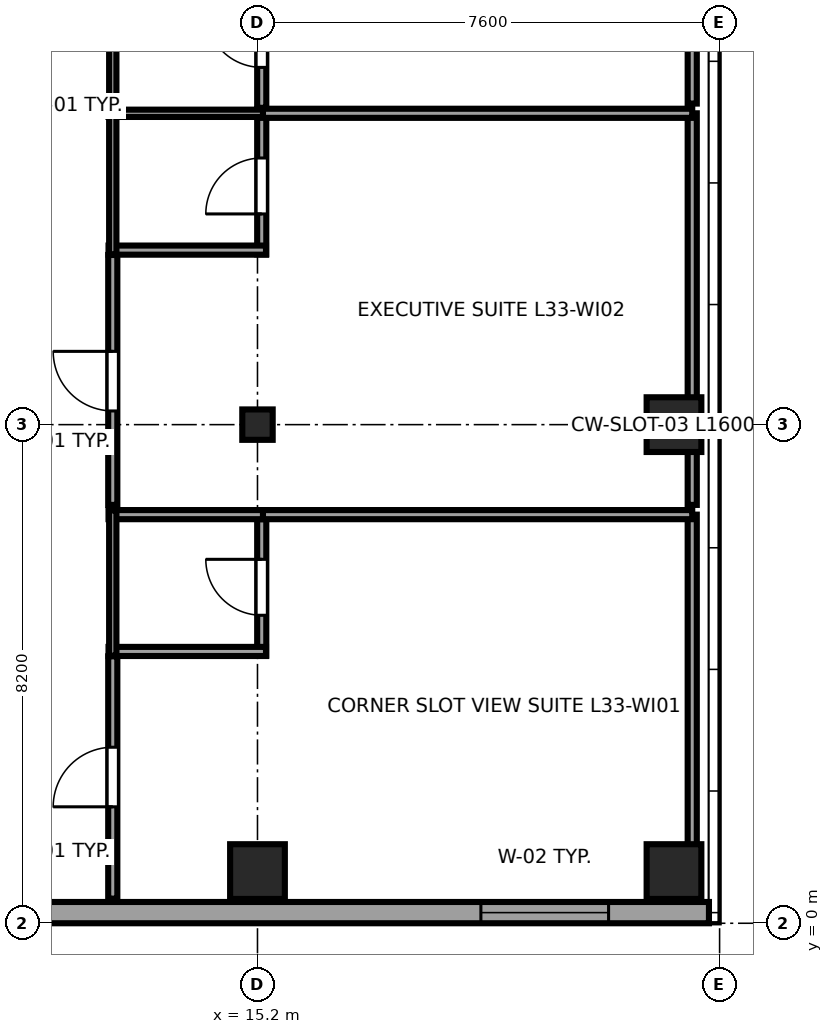
"""IFC4 building model, lengths in metres.
Left out: names, types, materials, properties, quantities, classifications, styles, units other than length and angle.
Written with IfcOpenShell. Run it as: python <this file> out.ifc"""

import sys

from ifc_helpers import new_model, si_unit, direction, frame, frame_2d, origin, origin_2d, place, context, subcontext, project, spatial, rectangle, i_section, extrude, source, transform, mapped, element, fill, save


model = new_model("IFC4")
c1 = context("Model", 3, precision=1e-05, world=origin(), true_north=direction((0.0, 1.0)))
c2 = subcontext(c1, "Body", "Model", "MODEL_VIEW")
j1 = project(units=[si_unit("LENGTHUNIT", "METRE"), si_unit("PLANEANGLEUNIT", "RADIAN")], contexts=[c1])
p1 = place(None, origin())
s1 = spatial("IfcSite", under=j1, at=p1, CompositionType="ELEMENT")
p2 = place(p1, origin())
s2 = spatial("IfcBuilding", under=s1, at=p2, CompositionType="ELEMENT")
p3 = place(p2, frame((0.0, 0.0, 129.3)))
s3 = spatial("IfcBuildingStorey", under=s2, at=p3, CompositionType="ELEMENT", Elevation=129.3)
m1 = source(origin(), c2, "Body", "SweptSolid", [
    extrude(rectangle(XDim=0.9, YDim=0.9, at=origin_2d()), origin(), (0.0, 0.0, 1.0), 3.55),
])
p4 = place(p3, frame((15.2, 0.85, 0.0), z_axis=(0.0, 0.0, 1.0), x_axis=(1.0, 0.0, 0.0)))
e1 = element("IfcColumn", 1, at=p4, inside=s3, PredefinedType="COLUMN", context=c2, shape_type="MappedRepresentation", body=[
    mapped(m1, transform((0.0, 0.0, 0.0), x_axis=(1.0, 0.0, 0.0), y_axis=(0.0, 1.0, 0.0), z_axis=(0.0, 0.0, 1.0), scale=1.0)),
])
m2 = source(origin(), c2, "Body", "SweptSolid", [
    extrude(i_section(OverallWidth=0.5, OverallDepth=0.5, WebThickness=0.022, FlangeThickness=0.034, at=origin_2d()), origin(), (0.0, 0.0, 1.0), 3.55),
])
p5 = place(p3, frame((15.2, 8.2, 0.0), z_axis=(0.0, 0.0, 1.0), x_axis=(1.0, 0.0, 0.0)))
e2 = element("IfcColumn", 2, at=p5, inside=s3, PredefinedType="COLUMN", context=c2, shape_type="MappedRepresentation", body=[
    mapped(m2, transform((0.0, 0.0, 0.0), x_axis=(1.0, 0.0, 0.0), y_axis=(0.0, 1.0, 0.0), z_axis=(0.0, 0.0, 1.0), scale=1.0)),
])
for number, where, z_axis, x_axis in (
    (3, (22.05, 0.85, 0.0), (0.0, 0.0, 1.0), (1.0, 0.0, 0.0)),
    (4, (22.05, 8.2, 0.0), (0.0, 0.0, 1.0), (1.0, 0.0, 0.0)),
):
    element("IfcColumn", number, at=place(p3, frame(where, z_axis=z_axis, x_axis=x_axis)), inside=s3, PredefinedType="COLUMN", context=c2, shape_type="MappedRepresentation", body=[
        mapped(m1, transform((0.0, 0.0, 0.0), x_axis=(1.0, 0.0, 0.0), y_axis=(0.0, 1.0, 0.0), z_axis=(0.0, 0.0, 1.0), scale=1.0)),
    ])
p6 = place(p3, frame((4.617, 0.175, 0.0), z_axis=(0.0, 0.0, 1.0), x_axis=(1.0, 0.0, 0.0)))
e5 = element("IfcWall", 5, at=p6, inside=s3, PredefinedType="SOLIDWALL", context=c2, shape_type="SweptSolid", body=[
    extrude(rectangle(XDim=18.008, YDim=0.35, at=frame_2d((9.004, 0.0))), origin(), (0.0, 0.0, 1.0), 3.37),
])
p7 = place(p6, frame((14.257, 0.0, 0.68)))
e6 = element("IfcOpeningElement", 6, at=p7, cuts=e5, PredefinedType="OPENING", context=c2, shape_type="SweptSolid", body=[
    extrude(rectangle(XDim=2.1, YDim=1.9, at=frame_2d((1.05, 0.95))), frame((0.0, 0.185, 0.0), z_axis=(0.0, -1.0, 0.0), x_axis=(1.0, 0.0, 0.0)), (0.0, 0.0, 1.0), 0.37),
])
p8 = place(p6, frame((2.391, 0.0, 0.62)))
e7 = element("IfcOpeningElement", 7, at=p8, cuts=e5, PredefinedType="OPENING", context=c2, shape_type="SweptSolid", body=[
    extrude(rectangle(XDim=1.5, YDim=1.55, at=frame_2d((0.75, 0.775))), frame((0.0, 0.185, 0.0), z_axis=(0.0, -1.0, 0.0), x_axis=(1.0, 0.0, 0.0)), (0.0, 0.0, 1.0), 0.37),
])
p9 = place(p3, frame((15.27, 4.4, 0.0), z_axis=(0.0, 0.0, 1.0), x_axis=(0.0, 1.0, 0.0)))
e8 = element("IfcWall", 8, at=p9, inside=s3, PredefinedType="PARTITIONING", context=c2, shape_type="SweptSolid", body=[
    extrude(rectangle(XDim=2.39, YDim=0.15, at=frame_2d((1.195, 0.0))), origin(), (0.0, 0.0, 1.0), 2.827),
])
p10 = place(p9, frame((0.665, 0.0, 0.0)))
e9 = element("IfcOpeningElement", 9, at=p10, cuts=e8, PredefinedType="OPENING", context=c2, shape_type="SweptSolid", body=[
    extrude(rectangle(XDim=0.92, YDim=2.01, at=frame_2d((0.46, 1.005))), frame((0.0, 0.085, 0.0), z_axis=(0.0, -1.0, 0.0), x_axis=(1.0, 0.0, 0.0)), (0.0, 0.0, 1.0), 0.17),
])
for number, where, z_axis, x_axis in (
    (10, (12.75, 4.47, 0.0), (0.0, 0.0, 1.0), (1.0, 0.0, 0.0)),
    (11, (12.75, 6.72, 0.0), (0.0, 0.0, 1.0), (1.0, 0.0, 0.0)),
):
    element("IfcWall", number, at=place(p3, frame(where, z_axis=z_axis, x_axis=x_axis)), inside=s3, PredefinedType="PARTITIONING", context=c2, shape_type="SweptSolid", body=[
        extrude(rectangle(XDim=2.59, YDim=0.15, at=frame_2d((1.295, 0.0))), origin(), (0.0, 0.0, 1.0), 3.37),
    ])
p11 = place(p3, frame((12.82, 4.4, 0.0), z_axis=(0.0, 0.0, 1.0), x_axis=(0.0, 1.0, 0.0)))
e12 = element("IfcWall", 12, at=p11, inside=s3, PredefinedType="PLUMBINGWALL", context=c2, shape_type="SweptSolid", body=[
    extrude(rectangle(XDim=2.39, YDim=0.12, at=frame_2d((1.195, 0.0))), origin(), (0.0, 0.0, 1.0), 3.37),
])
p12 = place(p3, frame((15.27, 11.0, 0.0), z_axis=(0.0, 0.0, 1.0), x_axis=(0.0, 1.0, 0.0)))
e13 = element("IfcWall", 13, at=p12, inside=s3, PredefinedType="PARTITIONING", context=c2, shape_type="SweptSolid", body=[
    extrude(rectangle(XDim=2.39, YDim=0.15, at=frame_2d((1.195, 0.0))), origin(), (0.0, 0.0, 1.0), 2.827),
])
p13 = place(p12, frame((0.665, 0.0, 0.0)))
e14 = element("IfcOpeningElement", 14, at=p13, cuts=e13, PredefinedType="OPENING", context=c2, shape_type="SweptSolid", body=[
    extrude(rectangle(XDim=0.92, YDim=2.01, at=frame_2d((0.46, 1.005))), frame((0.0, 0.085, 0.0), z_axis=(0.0, -1.0, 0.0), x_axis=(1.0, 0.0, 0.0)), (0.0, 0.0, 1.0), 0.17),
])
p14 = place(p3, frame((12.75, 11.07, 0.0), z_axis=(0.0, 0.0, 1.0), x_axis=(1.0, 0.0, 0.0)))
e15 = element("IfcWall", 15, at=p14, inside=s3, PredefinedType="PARTITIONING", context=c2, shape_type="SweptSolid", body=[
    extrude(rectangle(XDim=2.59, YDim=0.15, at=frame_2d((1.295, 0.0))), origin(), (0.0, 0.0, 1.0), 3.37),
])
p15 = place(p3, frame((12.75, 13.32, 0.0), z_axis=(0.0, 0.0, 1.0), x_axis=(1.0, 0.0, 0.0)))
e16 = element("IfcWall", 16, at=p15, inside=s3, PredefinedType="PLUMBINGWALL", context=c2, shape_type="SweptSolid", body=[
    extrude(rectangle(XDim=2.59, YDim=0.12, at=frame_2d((1.295, 0.0))), origin(), (0.0, 0.0, 1.0), 3.37),
])
p16 = place(p3, frame((12.82, 11.0, 0.0), z_axis=(0.0, 0.0, 1.0), x_axis=(0.0, 1.0, 0.0)))
e17 = element("IfcWall", 17, at=p16, inside=s3, PredefinedType="PLUMBINGWALL", context=c2, shape_type="SweptSolid", body=[
    extrude(rectangle(XDim=2.39, YDim=0.12, at=frame_2d((1.195, 0.0))), origin(), (0.0, 0.0, 1.0), 3.37),
])
p17 = place(p3, frame((15.27, 13.41, 0.0), z_axis=(0.0, 0.0, 1.0), x_axis=(0.0, 1.0, 0.0)))
e18 = element("IfcWall", 18, at=p17, inside=s3, PredefinedType="PARTITIONING", context=c2, shape_type="SweptSolid", body=[
    extrude(rectangle(XDim=2.39, YDim=0.15, at=frame_2d((1.195, 0.0))), origin(), (0.0, 0.0, 1.0), 2.827),
])
p18 = place(p17, frame((0.665, 0.0, 0.0)))
e19 = element("IfcOpeningElement", 19, at=p18, cuts=e18, PredefinedType="OPENING", context=c2, shape_type="SweptSolid", body=[
    extrude(rectangle(XDim=0.92, YDim=2.01, at=frame_2d((0.46, 1.005))), frame((0.0, 0.085, 0.0), z_axis=(0.0, -1.0, 0.0), x_axis=(1.0, 0.0, 0.0)), (0.0, 0.0, 1.0), 0.17),
])
p19 = place(p3, frame((12.82, 13.41, 0.0), z_axis=(0.0, 0.0, 1.0), x_axis=(0.0, 1.0, 0.0)))
e20 = element("IfcWall", 20, at=p19, inside=s3, PredefinedType="PLUMBINGWALL", context=c2, shape_type="SweptSolid", body=[
    extrude(rectangle(XDim=2.39, YDim=0.12, at=frame_2d((1.195, 0.0))), origin(), (0.0, 0.0, 1.0), 3.37),
])
p20 = place(p3, frame((12.82, 0.405, 0.0), z_axis=(0.0, 0.0, 1.0), x_axis=(0.0, 1.0, 0.0)))
e21 = element("IfcWall", 21, at=p20, inside=s3, PredefinedType="PARTITIONING", context=c2, shape_type="SweptSolid", body=[
    extrude(rectangle(XDim=3.985, YDim=0.15, at=frame_2d((1.992, 0.0))), origin(), (0.0, 0.0, 1.0), 3.37),
])
p21 = place(p20, frame((1.51, 0.0, 0.0)))
e22 = element("IfcOpeningElement", 22, at=p21, cuts=e21, PredefinedType="OPENING", context=c2, shape_type="SweptSolid", body=[
    extrude(rectangle(XDim=0.98, YDim=2.12, at=frame_2d((0.49, 1.06))), frame((0.0, 0.085, 0.0), z_axis=(0.0, -1.0, 0.0), x_axis=(1.0, 0.0, 0.0)), (0.0, 0.0, 1.0), 0.17),
])
p22 = place(p3, frame((22.35, 0.405, 0.0), z_axis=(0.0, 0.0, 1.0), x_axis=(0.0, 1.0, 0.0)))
e23 = element("IfcWall", 23, at=p22, inside=s3, PredefinedType="PARTITIONING", context=c2, shape_type="SweptSolid", body=[
    extrude(rectangle(XDim=6.315, YDim=0.15, at=frame_2d((3.157, 0.0))), origin(), (0.0, 0.0, 1.0), 3.37),
])
p23 = place(p3, frame((15.29, 6.72, 0.0), z_axis=(0.0, 0.0, 1.0), x_axis=(1.0, 0.0, 0.0)))
e24 = element("IfcWall", 24, at=p23, inside=s3, PredefinedType="PARTITIONING", context=c2, shape_type="SweptSolid", body=[
    extrude(rectangle(XDim=7.06, YDim=0.15, at=frame_2d((3.53, 0.0))), origin(), (0.0, 0.0, 1.0), 3.37),
])
p24 = place(p3, frame((12.82, 6.88, 0.0), z_axis=(0.0, 0.0, 1.0), x_axis=(0.0, 1.0, 0.0)))
e25 = element("IfcWall", 25, at=p24, inside=s3, PredefinedType="PARTITIONING", context=c2, shape_type="SweptSolid", body=[
    extrude(rectangle(XDim=4.11, YDim=0.15, at=frame_2d((2.055, 0.0))), origin(), (0.0, 0.0, 1.0), 3.37),
])
p25 = place(p24, frame((1.545, 0.0, 0.0)))
e26 = element("IfcOpeningElement", 26, at=p25, cuts=e25, PredefinedType="OPENING", context=c2, shape_type="SweptSolid", body=[
    extrude(rectangle(XDim=0.98, YDim=2.12, at=frame_2d((0.49, 1.06))), frame((0.0, 0.085, 0.0), z_axis=(0.0, -1.0, 0.0), x_axis=(1.0, 0.0, 0.0)), (0.0, 0.0, 1.0), 0.17),
])
p26 = place(p3, frame((22.35, 6.88, 0.0), z_axis=(0.0, 0.0, 1.0), x_axis=(0.0, 1.0, 0.0)))
e27 = element("IfcWall", 27, at=p26, inside=s3, PredefinedType="PARTITIONING", context=c2, shape_type="SweptSolid", body=[
    extrude(rectangle(XDim=6.44, YDim=0.15, at=frame_2d((3.22, 0.0))), origin(), (0.0, 0.0, 1.0), 3.37),
])
p27 = place(p3, frame((15.29, 13.32, 0.0), z_axis=(0.0, 0.0, 1.0), x_axis=(1.0, 0.0, 0.0)))
e28 = element("IfcWall", 28, at=p27, inside=s3, PredefinedType="PARTITIONING", context=c2, shape_type="SweptSolid", body=[
    extrude(rectangle(XDim=7.06, YDim=0.15, at=frame_2d((3.53, 0.0))), origin(), (0.0, 0.0, 1.0), 3.37),
])
p28 = place(p3, frame((22.35, 13.48, 0.0), z_axis=(0.0, 0.0, 1.0), x_axis=(0.0, 1.0, 0.0)))
e29 = element("IfcWall", 29, at=p28, inside=s3, PredefinedType="PARTITIONING", context=c2, shape_type="SweptSolid", body=[
    extrude(rectangle(XDim=6.54, YDim=0.15, at=frame_2d((3.27, 0.0))), origin(), (0.0, 0.0, 1.0), 3.37),
])
m3 = source(origin(), c2, "Body", "SweptSolid", [
    extrude(rectangle(XDim=2.1, YDim=1.9, at=frame_2d((1.05, 0.95))), frame((0.0, 0.09, 0.0), z_axis=(0.0, -1.0, 0.0), x_axis=(1.0, 0.0, 0.0)), (0.0, 0.0, 1.0), 0.06),
])
p29 = place(p7, origin())
e30 = element("IfcWindow", 30, at=p29, inside=s3, PartitioningType="TRIPLE_PANEL_HORIZONTAL", PredefinedType="WINDOW", context=c2, shape_type="MappedRepresentation", body=[
    mapped(m3, transform((0.0, 0.0, 0.0), x_axis=(1.0, 0.0, 0.0), y_axis=(0.0, 1.0, 0.0), z_axis=(0.0, 0.0, 1.0), scale=1.0)),
])
fill(e6, e30)
m4 = source(origin(), c2, "Body", "SweptSolid", [
    extrude(rectangle(XDim=0.92, YDim=2.01, at=frame_2d((0.46, 1.005))), frame((0.0, 0.025, 0.0), z_axis=(0.0, -1.0, 0.0), x_axis=(1.0, 0.0, 0.0)), (0.0, 0.0, 1.0), 0.05),
])
p30 = place(p10, origin())
e31 = element("IfcDoor", 31, at=p30, inside=s3, OperationType="SINGLE_SWING_RIGHT", PredefinedType="DOOR", context=c2, shape_type="MappedRepresentation", body=[
    mapped(m4, transform((0.0, 0.0, 0.0), x_axis=(1.0, 0.0, 0.0), y_axis=(0.0, 1.0, 0.0), z_axis=(0.0, 0.0, 1.0), scale=1.0)),
])
fill(e9, e31)
p31 = place(p13, origin())
e32 = element("IfcDoor", 32, at=p31, inside=s3, OperationType="SINGLE_SWING_LEFT", PredefinedType="DOOR", context=c2, shape_type="MappedRepresentation", body=[
    mapped(m4, transform((0.0, 0.0, 0.0), x_axis=(1.0, 0.0, 0.0), y_axis=(0.0, 1.0, 0.0), z_axis=(0.0, 0.0, 1.0), scale=1.0)),
])
fill(e14, e32)
p32 = place(p18, origin())
e33 = element("IfcDoor", 33, at=p32, inside=s3, OperationType="SINGLE_SWING_RIGHT", PredefinedType="DOOR", context=c2, shape_type="MappedRepresentation", body=[
    mapped(m4, transform((0.0, 0.0, 0.0), x_axis=(1.0, 0.0, 0.0), y_axis=(0.0, 1.0, 0.0), z_axis=(0.0, 0.0, 1.0), scale=1.0)),
])
fill(e19, e33)
m5 = source(origin(), c2, "Body", "SweptSolid", [
    extrude(rectangle(XDim=0.98, YDim=2.12, at=frame_2d((0.49, 1.06))), frame((0.0, 0.025, 0.0), z_axis=(0.0, -1.0, 0.0), x_axis=(1.0, 0.0, 0.0)), (0.0, 0.0, 1.0), 0.05),
])
p33 = place(p21, origin())
e34 = element("IfcDoor", 34, at=p33, inside=s3, OperationType="SINGLE_SWING_LEFT", PredefinedType="DOOR", context=c2, shape_type="MappedRepresentation", body=[
    mapped(m5, transform((0.0, 0.0, 0.0), x_axis=(1.0, 0.0, 0.0), y_axis=(0.0, 1.0, 0.0), z_axis=(0.0, 0.0, 1.0), scale=1.0)),
])
fill(e22, e34)
p34 = place(p25, origin())
e35 = element("IfcDoor", 35, at=p34, inside=s3, OperationType="SINGLE_SWING_RIGHT", PredefinedType="DOOR", context=c2, shape_type="MappedRepresentation", body=[
    mapped(m5, transform((0.0, 0.0, 0.0), x_axis=(1.0, 0.0, 0.0), y_axis=(0.0, 1.0, 0.0), z_axis=(0.0, 0.0, 1.0), scale=1.0)),
])
fill(e26, e35)
save(model, sys.argv[1])
